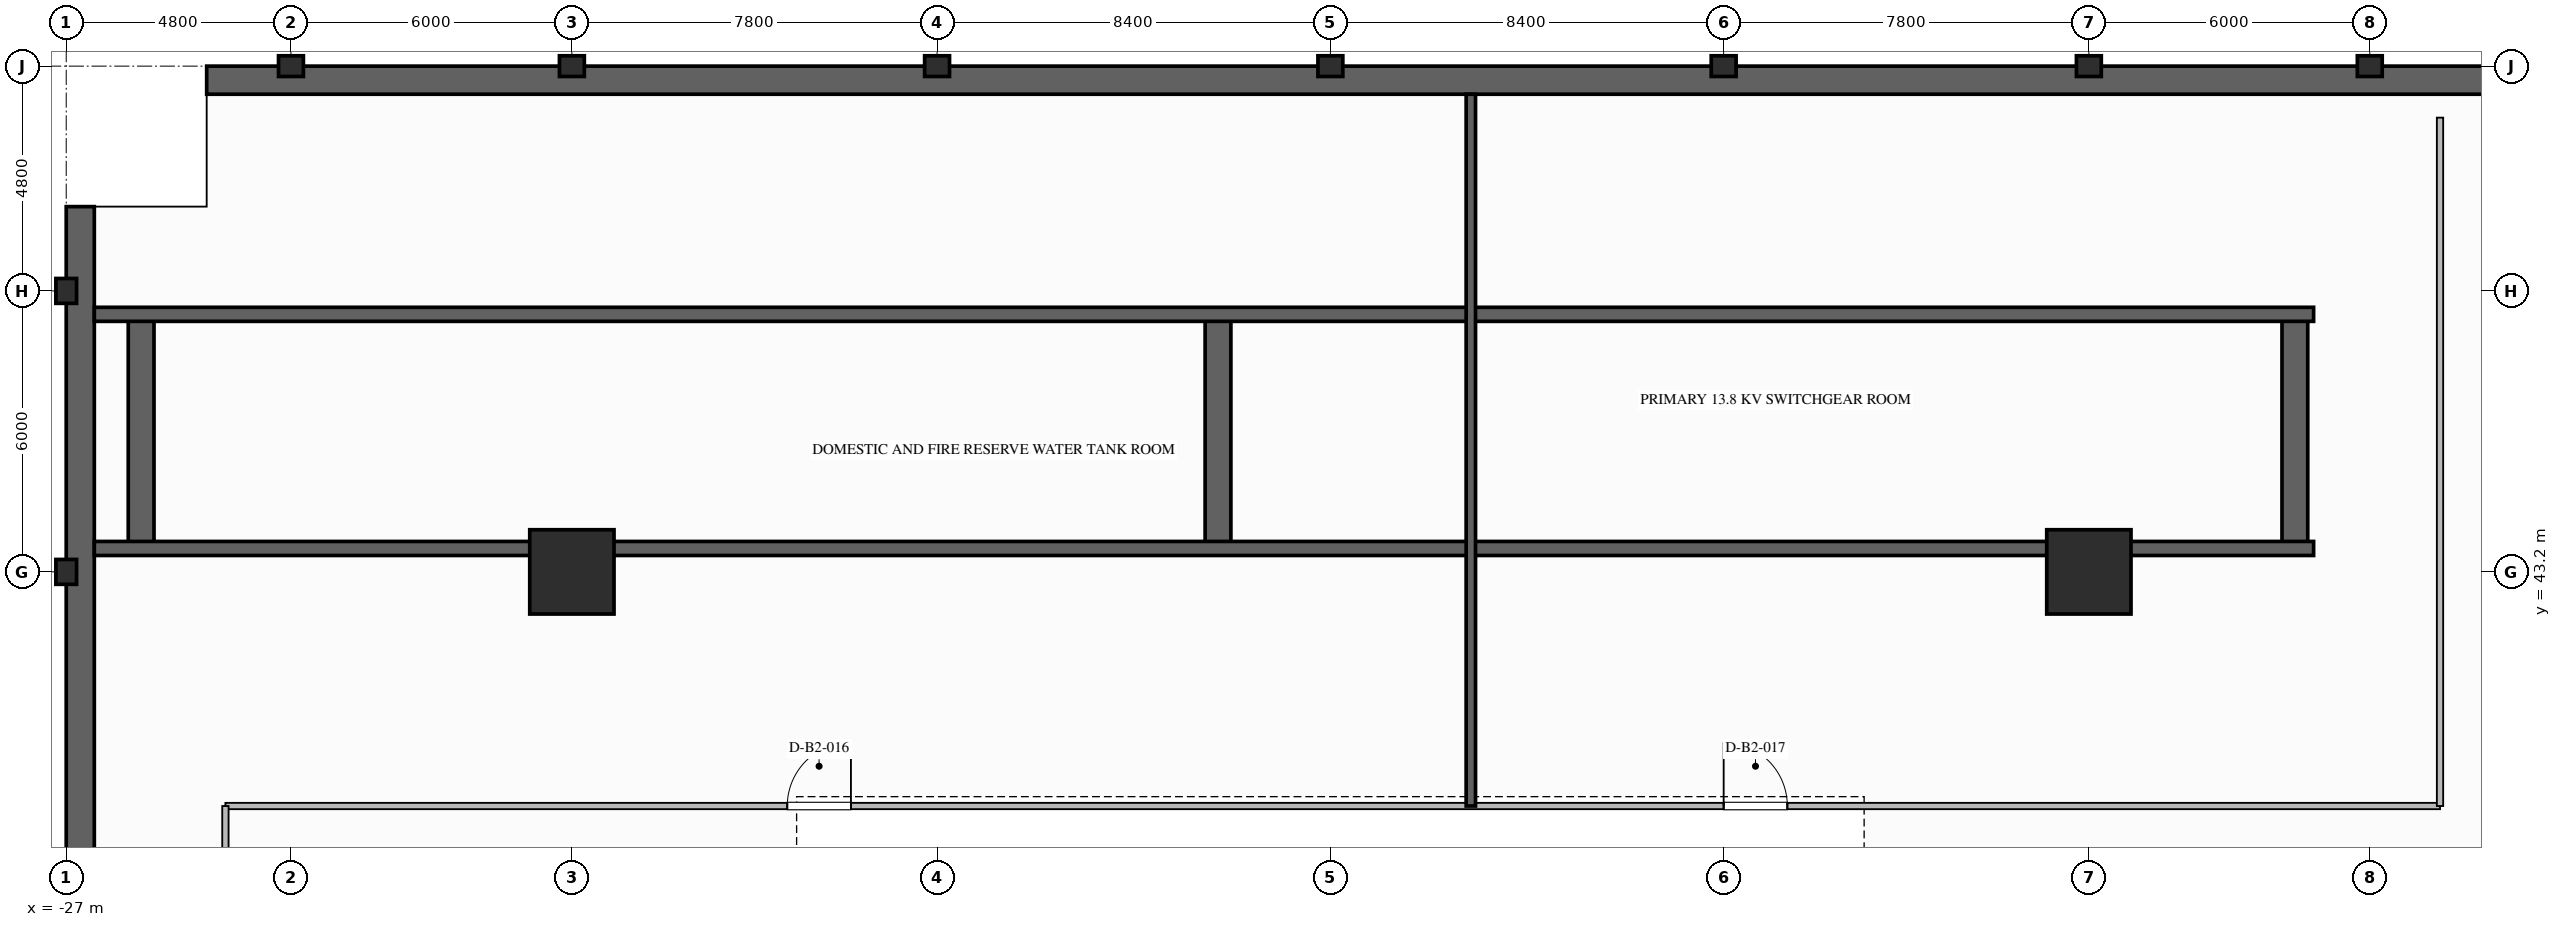
"""IFC4 building model, lengths in metres.
Left out: names, types, materials, properties, quantities, classifications, styles, units other than length and angle.
Written with IfcOpenShell. Run it as: python <this file> out.ifc"""

import sys

from ifc_helpers import new_model, si_unit, direction, frame, frame_2d, origin, origin_2d, place, context, subcontext, project, spatial, rectangle, i_section, extrude, element, fill, save


model = new_model("IFC4")
c1 = context("Model", 3, precision=1e-05, world=origin(), true_north=direction((0.0, 1.0)))
c2 = subcontext(c1, "Body", "Model", "MODEL_VIEW")
j1 = project(units=[si_unit("LENGTHUNIT", "METRE"), si_unit("PLANEANGLEUNIT", "RADIAN")], contexts=[c1])
p1 = place(None, origin())
s1 = spatial("IfcSite", under=j1, at=p1, CompositionType="ELEMENT")
p2 = place(p1, origin())
s2 = spatial("IfcBuilding", under=s1, at=p2, CompositionType="ELEMENT")
p3 = place(p2, frame((0.0, 0.0, -10.8)))
s3 = spatial("IfcBuildingStorey", under=s2, at=p3, CompositionType="ELEMENT", Elevation=-10.8)
p4 = place(p3, frame((-24.0, 53.7, 0.0), z_axis=(0.0, 0.0, 1.0), x_axis=(1.0, 0.0, 0.0)))
e1 = element("IfcWall", 1, at=p4, inside=s3, PredefinedType="USERDEFINED", context=c2, shape_type="SweptSolid", body=[
    extrude(rectangle(XDim=60.0, YDim=0.6, at=frame_2d((30.0, 0.0))), origin(), (0.0, 0.0, 1.0), 5.05),
])
p5 = place(p3, frame((-26.7, 3.0, 0.0), z_axis=(0.0, 0.0, 1.0), x_axis=(0.0, 1.0, 0.0)))
e2 = element("IfcWall", 2, at=p5, inside=s3, PredefinedType="USERDEFINED", context=c2, shape_type="SweptSolid", body=[
    extrude(rectangle(XDim=48.0, YDim=0.6, at=frame_2d((24.0, 0.0))), origin(), (0.0, 0.0, 1.0), 5.05),
])
for number, where, z_axis, x_axis in (
    (3, (-16.2, 43.2, 0.0), (0.0, 0.0, 1.0), (1.0, 0.0, 0.0)),
    (4, (16.2, 43.2, 0.0), (0.0, 0.0, 1.0), (1.0, 0.0, 0.0)),
):
    element("IfcColumn", number, at=place(p3, frame(where, z_axis=z_axis, x_axis=x_axis)), inside=s3, PredefinedType="COLUMN", context=c2, shape_type="SweptSolid", body=[
        extrude(rectangle(XDim=1.8, YDim=1.8, at=origin_2d()), origin(), (0.0, 0.0, 1.0), 5.4),
    ])
for number, where, z_axis, x_axis in (
    (5, (-27.0, 43.2, 0.0), (0.0, 0.0, 1.0), (1.0, 0.0, 0.0)),
    (6, (-27.0, 49.2, 0.0), (0.0, 0.0, 1.0), (1.0, 0.0, 0.0)),
    (7, (-22.2, 54.0, 0.0), (0.0, 0.0, 1.0), (0.0, 1.0, 0.0)),
    (8, (-16.2, 54.0, 0.0), (0.0, 0.0, 1.0), (0.0, 1.0, 0.0)),
    (9, (-8.4, 54.0, 0.0), (0.0, 0.0, 1.0), (0.0, 1.0, 0.0)),
    (10, (0.0, 54.0, 0.0), (0.0, 0.0, 1.0), (0.0, 1.0, 0.0)),
    (11, (8.4, 54.0, 0.0), (0.0, 0.0, 1.0), (0.0, 1.0, 0.0)),
    (12, (16.2, 54.0, 0.0), (0.0, 0.0, 1.0), (0.0, 1.0, 0.0)),
    (13, (22.2, 54.0, 0.0), (0.0, 0.0, 1.0), (0.0, 1.0, 0.0)),
):
    element("IfcColumn", number, at=place(p3, frame(where, z_axis=z_axis, x_axis=x_axis)), inside=s3, PredefinedType="COLUMN", context=c2, shape_type="SweptSolid", body=[
        extrude(i_section(OverallWidth=0.442, OverallDepth=0.531, WebThickness=0.066, FlangeThickness=0.106, FilletRadius=0.03, at=origin_2d()), origin(), (0.0, 0.0, 1.0), 5.4),
    ])
p6 = place(p3, frame((-25.4, 43.7, 0.0), z_axis=(0.0, 0.0, 1.0), x_axis=(0.0, 1.0, 0.0)))
e14 = element("IfcWall", 14, at=p6, inside=s3, PredefinedType="USERDEFINED", context=c2, shape_type="SweptSolid", body=[
    extrude(rectangle(XDim=5.0, YDim=0.55, at=frame_2d((2.5, 0.0))), origin(), (0.0, 0.0, 1.0), 10.56),
])
p7 = place(p3, frame((-2.4, 43.7, 0.0), z_axis=(0.0, 0.0, 1.0), x_axis=(0.0, 1.0, 0.0)))
e15 = element("IfcWall", 15, at=p7, inside=s3, PredefinedType="USERDEFINED", context=c2, shape_type="SweptSolid", body=[
    extrude(rectangle(XDim=5.0, YDim=0.55, at=frame_2d((2.5, 0.0))), origin(), (0.0, 0.0, 1.0), 7.86),
])
p8 = place(p3, frame((20.6, 43.7, 0.0), z_axis=(0.0, 0.0, 1.0), x_axis=(0.0, 1.0, 0.0)))
e16 = element("IfcWall", 16, at=p8, inside=s3, PredefinedType="USERDEFINED", context=c2, shape_type="SweptSolid", body=[
    extrude(rectangle(XDim=5.0, YDim=0.55, at=frame_2d((2.5, 0.0))), origin(), (0.0, 0.0, 1.0), 5.16),
])
for number, where, z_axis, x_axis in (
    (17, (-26.4, 43.7, 0.0), (0.0, 0.0, 1.0), (1.0, 0.0, 0.0)),
    (18, (-26.4, 48.7, 0.0), (0.0, 0.0, 1.0), (1.0, 0.0, 0.0)),
):
    element("IfcWall", number, at=place(p3, frame(where, z_axis=z_axis, x_axis=x_axis)), inside=s3, PredefinedType="USERDEFINED", context=c2, shape_type="SweptSolid", body=[
        extrude(rectangle(XDim=47.4, YDim=0.3, at=frame_2d((23.7, 0.0))), origin(), (0.0, 0.0, 1.0), 5.4),
    ])
p9 = place(p2, frame((0.0, 0.0, -5.4)))
s4 = spatial("IfcBuildingStorey", under=s2, at=p9, CompositionType="ELEMENT", Elevation=-5.4)
for number, where, z_axis, x_axis in (
    (19, (-32.325, 42.0, -5.4), (0.0, 0.0, 1.0), (1.0, 0.0, 0.0)),
    (20, (-32.325, 50.55, -5.4), (0.0, 0.0, 1.0), (1.0, 0.0, 0.0)),
):
    element("IfcWall", number, at=place(p9, frame(where, z_axis=z_axis, x_axis=x_axis)), inside=s4, PredefinedType="USERDEFINED", context=c2, shape_type="SweptSolid", body=[
        extrude(rectangle(XDim=5.325, YDim=0.45, at=frame_2d((2.663, 0.0))), origin(), (0.0, 0.0, 1.0), 10.62),
    ])
p10 = place(p9, frame((-23.55, 54.0, -5.4), z_axis=(0.0, 0.0, 1.0), x_axis=(0.0, 1.0, 0.0)))
e21 = element("IfcWall", 21, at=p10, inside=s4, PredefinedType="USERDEFINED", context=c2, shape_type="SweptSolid", body=[
    extrude(rectangle(XDim=2.325, YDim=0.45, at=frame_2d((1.163, 0.0))), origin(), (0.0, 0.0, 1.0), 10.62),
])
p11 = place(p3, frame((-23.6, 38.2, 0.0), z_axis=(0.0, 0.0, 1.0), x_axis=(1.0, 0.0, 0.0)))
e22 = element("IfcWall", 22, at=p11, inside=s3, PredefinedType="PARTITIONING", context=c2, shape_type="SweptSolid", body=[
    extrude(rectangle(XDim=47.3, YDim=0.135, at=frame_2d((23.65, 0.0))), origin(), (0.0, 0.0, 1.0), 5.05),
])
p12 = place(p11, frame((12.0, 0.0, 0.0)))
e23 = element("IfcOpeningElement", 23, at=p12, cuts=e22, PredefinedType="OPENING", context=c2, shape_type="SweptSolid", body=[
    extrude(rectangle(XDim=1.36, YDim=2.2, at=frame_2d((0.68, 1.1))), frame((0.0, 0.077, 0.0), z_axis=(0.0, -1.0, 0.0), x_axis=(1.0, 0.0, 0.0)), (0.0, 0.0, 1.0), 0.155),
])
p13 = place(p11, frame((32.0, 0.0, 0.0)))
e24 = element("IfcOpeningElement", 24, at=p13, cuts=e22, PredefinedType="OPENING", context=c2, shape_type="SweptSolid", body=[
    extrude(rectangle(XDim=1.36, YDim=2.2, at=frame_2d((0.68, 1.1))), frame((0.0, 0.077, 0.0), z_axis=(0.0, -1.0, 0.0), x_axis=(1.0, 0.0, 0.0)), (0.0, 0.0, 1.0), 0.155),
])
p14 = place(p3, frame((-23.6, 0.6, 0.0), z_axis=(0.0, 0.0, 1.0), x_axis=(0.0, 1.0, 0.0)))
e25 = element("IfcWall", 25, at=p14, inside=s3, PredefinedType="PARTITIONING", context=c2, shape_type="SweptSolid", body=[
    extrude(rectangle(XDim=37.6, YDim=0.135, at=frame_2d((18.8, 0.0))), origin(), (0.0, 0.0, 1.0), 5.05),
])
p15 = place(p14, frame((15.0, 0.0, 0.0)))
e26 = element("IfcOpeningElement", 26, at=p15, cuts=e25, PredefinedType="OPENING", context=c2, shape_type="SweptSolid", body=[
    extrude(rectangle(XDim=1.36, YDim=2.2, at=frame_2d((0.68, 1.1))), frame((0.0, 0.077, 0.0), z_axis=(0.0, -1.0, 0.0), x_axis=(1.0, 0.0, 0.0)), (0.0, 0.0, 1.0), 0.155),
])
p16 = place(p3, frame((23.7, 38.2, 0.0), z_axis=(0.0, 0.0, 1.0), x_axis=(0.0, 1.0, 0.0)))
e27 = element("IfcWall", 27, at=p16, inside=s3, PredefinedType="PARTITIONING", context=c2, shape_type="SweptSolid", body=[
    extrude(rectangle(XDim=14.7, YDim=0.135, at=frame_2d((7.35, 0.0))), origin(), (0.0, 0.0, 1.0), 5.05),
])
p17 = place(p3, frame((3.0, 38.2, 0.0), z_axis=(0.0, 0.0, 1.0), x_axis=(0.0, 1.0, 0.0)))
e28 = element("IfcWall", 28, at=p17, inside=s3, PredefinedType="SOLIDWALL", context=c2, shape_type="SweptSolid", body=[
    extrude(rectangle(XDim=15.2, YDim=0.2, at=frame_2d((7.6, 0.0))), origin(), (0.0, 0.0, 1.0), 5.05),
])
p18 = place(p12, origin())
e29 = element("IfcDoor", 29, at=p18, inside=s3, OperationType="SINGLE_SWING_RIGHT", PredefinedType="DOOR", context=c2, shape_type="SweptSolid", body=[
    extrude(rectangle(XDim=1.36, YDim=2.2, at=frame_2d((0.68, 1.1))), frame((0.0, 0.025, 0.0), z_axis=(0.0, -1.0, 0.0), x_axis=(1.0, 0.0, 0.0)), (0.0, 0.0, 1.0), 0.05),
])
fill(e23, e29)
p19 = place(p13, origin())
e30 = element("IfcDoor", 30, at=p19, inside=s3, OperationType="SINGLE_SWING_LEFT", PredefinedType="DOOR", context=c2, shape_type="SweptSolid", body=[
    extrude(rectangle(XDim=1.36, YDim=2.2, at=frame_2d((0.68, 1.1))), frame((0.0, 0.025, 0.0), z_axis=(0.0, -1.0, 0.0), x_axis=(1.0, 0.0, 0.0)), (0.0, 0.0, 1.0), 0.05),
])
fill(e24, e30)
save(model, sys.argv[1])
